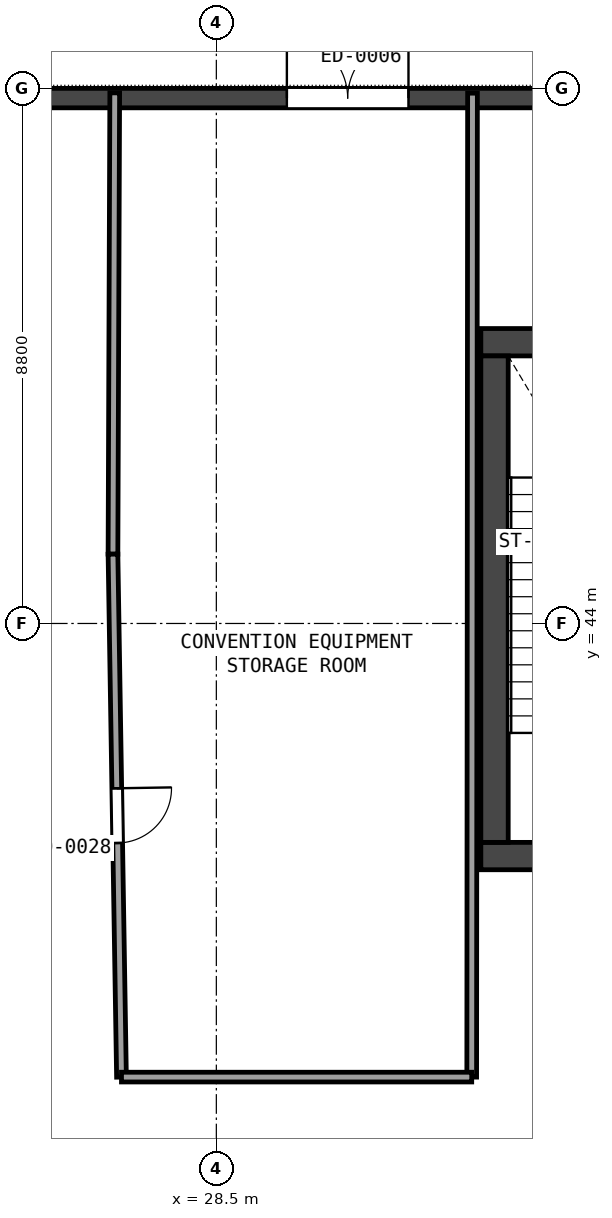
"""IFC4 building model, lengths in metres.
Left out: names, types, materials, properties, quantities, classifications, styles, units other than length and angle.
Written with IfcOpenShell. Run it as: python <this file> out.ifc"""

import sys

from ifc_helpers import new_model, si_unit, direction, frame, frame_2d, origin, place, context, subcontext, project, spatial, rectangle, extrude, element, fill, save


model = new_model("IFC4")
c1 = context("Model", 3, precision=1e-05, world=origin(), true_north=direction((0.0, 1.0)))
c2 = subcontext(c1, "Body", "Model", "MODEL_VIEW")
j1 = project(units=[si_unit("LENGTHUNIT", "METRE"), si_unit("PLANEANGLEUNIT", "RADIAN")], contexts=[c1])
p1 = place(None, origin())
s1 = spatial("IfcSite", under=j1, at=p1, CompositionType="ELEMENT")
p2 = place(p1, origin())
s2 = spatial("IfcBuilding", under=s1, at=p2, CompositionType="ELEMENT")
p3 = place(p2, origin())
s3 = spatial("IfcBuildingStorey", under=s2, at=p3, CompositionType="ELEMENT", Elevation=0.0)
for number, where, z_axis, x_axis in (
    (1, (32.85, 40.175, 0.0), (0.0, 0.0, 1.0), (1.0, 0.0, 0.0)),
    (2, (32.85, 48.625, 0.0), (0.0, 0.0, 1.0), (1.0, 0.0, 0.0)),
):
    element("IfcWall", number, at=place(p3, frame(where, z_axis=z_axis, x_axis=x_axis)), inside=s3, PredefinedType="SHEAR", context=c2, shape_type="SweptSolid", body=[
        extrude(rectangle(XDim=4.6, YDim=0.45, at=frame_2d((2.3, 0.0))), origin(), (0.0, 0.0, 1.0), 5.05),
    ])
p4 = place(p3, frame((33.075, 40.4, 0.0), z_axis=(0.0, 0.0, 1.0), x_axis=(0.0, 1.0, 0.0)))
e3 = element("IfcWall", 3, at=p4, inside=s3, PredefinedType="SHEAR", context=c2, shape_type="SweptSolid", body=[
    extrude(rectangle(XDim=8.0, YDim=0.45, at=frame_2d((4.0, 0.0))), origin(), (0.0, 0.0, 1.0), 5.05),
])
p5 = place(p3, frame((0.16, 52.64, 0.0), z_axis=(0.0, 0.0, 1.0), x_axis=(1.0, 0.0, 0.0)))
e4 = element("IfcWall", 4, at=p5, inside=s3, PredefinedType="SOLIDWALL", context=c2, shape_type="SweptSolid", body=[
    extrude(rectangle(XDim=75.68, YDim=0.32, at=frame_2d((37.84, 0.0))), origin(), (0.0, 0.0, 1.0), 5.05),
])
p6 = place(p5, frame((15.0, 0.0, 0.0)))
e5 = element("IfcOpeningElement", 5, at=p6, cuts=e4, PredefinedType="OPENING", context=c2, shape_type="SweptSolid", body=[
    extrude(rectangle(XDim=2.0, YDim=2.4, at=frame_2d((1.0, 1.2))), frame((0.0, 0.17, 0.0), z_axis=(0.0, -1.0, 0.0), x_axis=(1.0, 0.0, 0.0)), (0.0, 0.0, 1.0), 0.34),
])
p7 = place(p5, frame((29.5, 0.0, 0.0)))
e6 = element("IfcOpeningElement", 6, at=p7, cuts=e4, PredefinedType="OPENING", context=c2, shape_type="SweptSolid", body=[
    extrude(rectangle(XDim=2.0, YDim=2.4, at=frame_2d((1.0, 1.2))), frame((0.0, 0.17, 0.0), z_axis=(0.0, -1.0, 0.0), x_axis=(1.0, 0.0, 0.0)), (0.0, 0.0, 1.0), 0.34),
])
p8 = place(p5, frame((42.5, 0.0, 0.0)))
e7 = element("IfcOpeningElement", 7, at=p8, cuts=e4, PredefinedType="OPENING", context=c2, shape_type="SweptSolid", body=[
    extrude(rectangle(XDim=2.0, YDim=2.4, at=frame_2d((1.0, 1.2))), frame((0.0, 0.17, 0.0), z_axis=(0.0, -1.0, 0.0), x_axis=(1.0, 0.0, 0.0)), (0.0, 0.0, 1.0), 0.34),
])
p9 = place(p5, frame((58.0, 0.0, 0.0)))
e8 = element("IfcOpeningElement", 8, at=p9, cuts=e4, PredefinedType="OPENING", context=c2, shape_type="SweptSolid", body=[
    extrude(rectangle(XDim=2.0, YDim=2.4, at=frame_2d((1.0, 1.2))), frame((0.0, 0.17, 0.0), z_axis=(0.0, -1.0, 0.0), x_axis=(1.0, 0.0, 0.0)), (0.0, 0.0, 1.0), 0.34),
])
p10 = place(p3, frame((32.7, 36.54, 0.0), z_axis=(0.0, 0.0, 1.0), x_axis=(0.000799673839, 0.999999680261, 0.0)))
e9 = element("IfcWall", 9, at=p10, inside=s3, PredefinedType="PARTITIONING", context=c2, shape_type="SweptSolid", body=[
    extrude(rectangle(XDim=16.181, YDim=0.16, at=frame_2d((8.09, 0.0))), origin(), (0.0, 0.0, 1.0), 4.123),
])
p11 = place(p3, frame((26.829, 52.726, 0.0), z_axis=(0.0, 0.0, 1.0), x_axis=(-0.003829663288, -0.999992666813, 0.0)))
e10 = element("IfcWall", 10, at=p11, inside=s3, PredefinedType="PARTITIONING", context=c2, shape_type="SweptSolid", body=[
    extrude(rectangle(XDim=7.586, YDim=0.16, at=frame_2d((3.793, 0.0))), origin(), (0.0, 0.0, 1.0), 4.123),
])
p12 = place(p3, frame((26.8, 45.14, 0.0), z_axis=(0.0, 0.0, 1.0), x_axis=(0.016264704162, -0.99986772095, 0.0)))
e11 = element("IfcWall", 11, at=p12, inside=s3, PredefinedType="PARTITIONING", context=c2, shape_type="SweptSolid", body=[
    extrude(rectangle(XDim=8.601, YDim=0.16, at=frame_2d((4.301, 0.0))), origin(), (0.0, 0.0, 1.0), 5.05),
])
p13 = place(p12, frame((3.851, 0.0, 0.0)))
e12 = element("IfcOpeningElement", 12, at=p13, cuts=e11, PredefinedType="OPENING", context=c2, shape_type="SweptSolid", body=[
    extrude(rectangle(XDim=0.9, YDim=2.0, at=frame_2d((0.45, 1.0))), frame((0.0, 0.09, 0.0), z_axis=(0.0, -1.0, 0.0), x_axis=(1.0, 0.0, 0.0)), (0.0, 0.0, 1.0), 0.18),
])
p14 = place(p3, frame((26.94, 36.54, 0.0), z_axis=(0.0, 0.0, 1.0), x_axis=(1.0, 0.0, 0.0)))
e13 = element("IfcWall", 13, at=p14, inside=s3, PredefinedType="PARTITIONING", context=c2, shape_type="SweptSolid", body=[
    extrude(rectangle(XDim=5.76, YDim=0.16, at=frame_2d((2.88, 0.0))), origin(), (0.0, 0.0, 1.0), 5.05),
])
p15 = place(p7, origin())
e14 = element("IfcDoor", 14, at=p15, inside=s3, OperationType="DOUBLE_DOOR_SINGLE_SWING", PredefinedType="DOOR", context=c2, shape_type="SweptSolid", body=[
    extrude(rectangle(XDim=2.0, YDim=2.4, at=frame_2d((1.0, 1.2))), frame((0.0, 0.025, 0.0), z_axis=(0.0, -1.0, 0.0), x_axis=(1.0, 0.0, 0.0)), (0.0, 0.0, 1.0), 0.05),
])
fill(e6, e14)
p16 = place(p13, origin())
e15 = element("IfcDoor", 15, at=p16, inside=s3, OperationType="SINGLE_SWING_LEFT", PredefinedType="DOOR", context=c2, shape_type="SweptSolid", body=[
    extrude(rectangle(XDim=0.9, YDim=2.0, at=frame_2d((0.45, 1.0))), frame((0.0, 0.025, 0.0), z_axis=(0.0, -1.0, 0.0), x_axis=(1.0, 0.0, 0.0)), (0.0, 0.0, 1.0), 0.05),
])
fill(e12, e15)
save(model, sys.argv[1])
